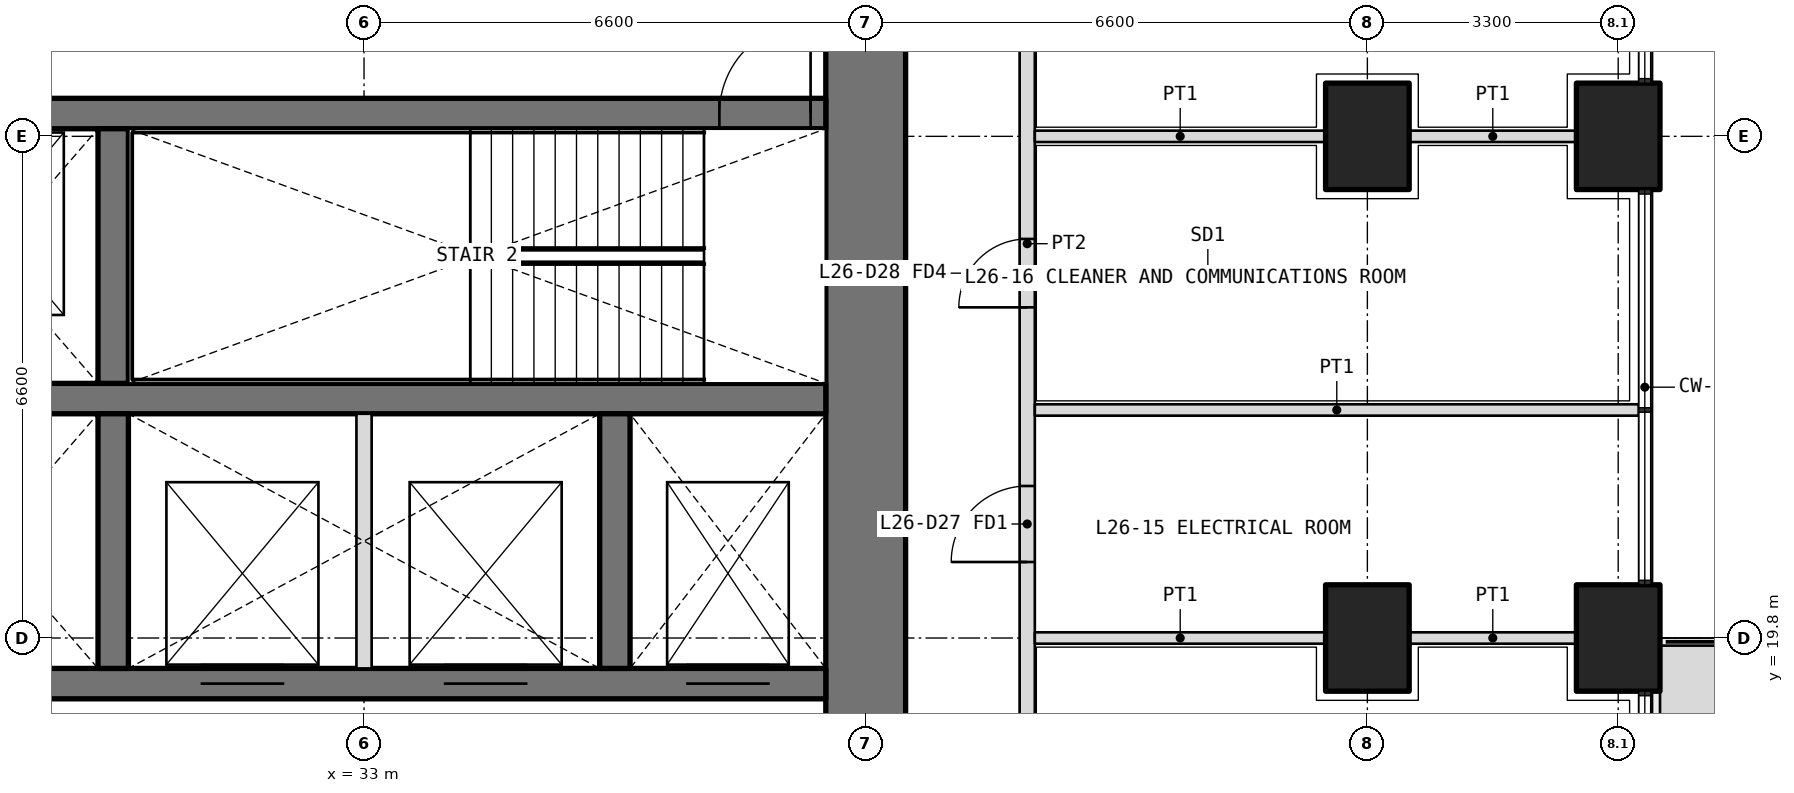
"""IFC4 building model, lengths in metres.
Left out: names, types, materials, properties, quantities, classifications, styles, units other than length and angle.
Written with IfcOpenShell. Run it as: python <this file> out.ifc"""

import sys

from ifc_helpers import new_model, si_unit, direction, frame, frame_2d, origin, origin_2d, place, context, subcontext, project, spatial, polyline, rectangle, outline, extrude, element, fill, save


model = new_model("IFC4")
c1 = context("Model", 3, precision=1e-05, world=origin(), true_north=direction((0.0, 1.0)))
c2 = subcontext(c1, "Body", "Model", "MODEL_VIEW")
j1 = project(units=[si_unit("LENGTHUNIT", "METRE"), si_unit("PLANEANGLEUNIT", "RADIAN")], contexts=[c1])
p1 = place(None, origin())
s1 = spatial("IfcSite", under=j1, at=p1, CompositionType="ELEMENT")
p2 = place(p1, origin())
s2 = spatial("IfcBuilding", under=s1, at=p2, CompositionType="ELEMENT")
p3 = place(p2, frame((0.0, 0.0, 115.8)))
s3 = spatial("IfcBuildingStorey", under=s2, at=p3, CompositionType="ELEMENT", Elevation=115.8)
for number, where, z_axis, x_axis in (
    (1, (49.5, 19.8, 0.0), (0.0, 0.0, 1.0), (0.0, 1.0, 0.0)),
    (2, (49.5, 26.4, 0.0), (0.0, 0.0, 1.0), (0.0, 1.0, 0.0)),
    (3, (46.2, 19.8, 0.0), (0.0, 0.0, 1.0), (0.0, 1.0, 0.0)),
    (4, (46.2, 26.4, 0.0), (0.0, 0.0, 1.0), (0.0, 1.0, 0.0)),
):
    element("IfcColumn", number, at=place(p3, frame(where, z_axis=z_axis, x_axis=x_axis)), inside=s3, PredefinedType="COLUMN", context=c2, shape_type="SweptSolid", body=[
        extrude(rectangle(XDim=1.4, YDim=1.1, at=origin_2d()), origin(), (0.0, 0.0, 1.0), 4.2),
    ])
p4 = place(p3, origin())
e5 = element("IfcWall", 5, at=p4, inside=s3, PredefinedType="USERDEFINED", context=c2, shape_type="SweptSolid", body=[
    extrude(outline(polyline([(50.05, 10.65), (51.05, 10.65), (51.05, 19.7), (50.05, 19.7), (50.05, 10.65)]), holes=[polyline([(50.2, 10.8), (50.9, 10.8), (50.9, 19.55), (50.2, 19.55), (50.2, 10.8)])]), origin(), (0.0, 0.0, 1.0), 1.05),
])
p5 = place(p3, frame((39.6, 13.725, 0.0), z_axis=(0.0, 0.0, 1.0), x_axis=(0.0, 1.0, 0.0)))
e6 = element("IfcWall", 6, at=p5, inside=s3, PredefinedType="SHEAR", context=c2, shape_type="SweptSolid", body=[
    extrude(rectangle(XDim=18.75, YDim=1.05, at=frame_2d((9.375, 0.0))), origin(), (0.0, 0.0, 1.0), 4.2),
])
p6 = place(p5, frame((3.025, 0.0, 0.0)))
e7 = element("IfcOpeningElement", 7, at=p6, cuts=e6, PredefinedType="OPENING", context=c2, shape_type="SweptSolid", body=[
    extrude(rectangle(XDim=1.6, YDim=2.1, at=frame_2d((0.8, 1.05))), frame((0.0, 0.535, 0.0), z_axis=(0.0, -1.0, 0.0), x_axis=(1.0, 0.0, 0.0)), (0.0, 0.0, 1.0), 1.07),
])
p7 = place(p5, frame((13.825, 0.0, 0.0)))
e8 = element("IfcOpeningElement", 8, at=p7, cuts=e6, PredefinedType="OPENING", context=c2, shape_type="SweptSolid", body=[
    extrude(rectangle(XDim=1.6, YDim=2.1, at=frame_2d((0.8, 1.05))), frame((0.0, 0.535, 0.0), z_axis=(0.0, -1.0, 0.0), x_axis=(1.0, 0.0, 0.0)), (0.0, 0.0, 1.0), 1.07),
])
p8 = place(p3, frame((13.725, 19.2, 0.0), z_axis=(0.0, 0.0, 1.0), x_axis=(1.0, 0.0, 0.0)))
e9 = element("IfcWall", 9, at=p8, inside=s3, PredefinedType="SHEAR", context=c2, shape_type="SweptSolid", body=[
    extrude(rectangle(XDim=25.35, YDim=0.4, at=frame_2d((12.675, 0.0))), origin(), (0.0, 0.0, 1.0), 4.2),
])
p9 = place(p8, frame((10.575, 0.0, 0.0)))
e10 = element("IfcOpeningElement", 10, at=p9, cuts=e9, PredefinedType="OPENING", context=c2, shape_type="SweptSolid", body=[
    extrude(rectangle(XDim=0.9, YDim=2.1, at=frame_2d((0.45, 1.05))), frame((0.0, 0.21, 0.0), z_axis=(0.0, -1.0, 0.0), x_axis=(1.0, 0.0, 0.0)), (0.0, 0.0, 1.0), 0.42),
])
p10 = place(p8, frame((13.875, 0.0, 0.0)))
e11 = element("IfcOpeningElement", 11, at=p10, cuts=e9, PredefinedType="OPENING", context=c2, shape_type="SweptSolid", body=[
    extrude(rectangle(XDim=0.9, YDim=2.1, at=frame_2d((0.45, 1.05))), frame((0.0, 0.21, 0.0), z_axis=(0.0, -1.0, 0.0), x_axis=(1.0, 0.0, 0.0)), (0.0, 0.0, 1.0), 0.42),
])
p11 = place(p8, frame((0.2, 0.0, 0.0)))
e12 = element("IfcOpeningElement", 12, at=p11, cuts=e9, PredefinedType="OPENING", context=c2, shape_type="SweptSolid", body=[
    extrude(rectangle(XDim=1.2, YDim=2.1, at=frame_2d((0.6, 1.05))), frame((0.0, 0.21, 0.0), z_axis=(0.0, -1.0, 0.0), x_axis=(1.0, 0.0, 0.0)), (0.0, 0.0, 1.0), 0.42),
])
p12 = place(p8, frame((23.512, 0.0, 0.0)))
e13 = element("IfcOpeningElement", 13, at=p12, cuts=e9, PredefinedType="OPENING", context=c2, shape_type="SweptSolid", body=[
    extrude(rectangle(XDim=1.1, YDim=2.1, at=frame_2d((0.55, 1.05))), frame((0.0, 0.21, 0.0), z_axis=(0.0, -1.0, 0.0), x_axis=(1.0, 0.0, 0.0)), (0.0, 0.0, 1.0), 0.42),
])
p13 = place(p8, frame((17.125, 0.0, 0.0)))
e14 = element("IfcOpeningElement", 14, at=p13, cuts=e9, PredefinedType="OPENING", context=c2, shape_type="SweptSolid", body=[
    extrude(rectangle(XDim=1.1, YDim=2.1, at=frame_2d((0.55, 1.05))), frame((0.0, 0.21, 0.0), z_axis=(0.0, -1.0, 0.0), x_axis=(1.0, 0.0, 0.0)), (0.0, 0.0, 1.0), 0.42),
])
p14 = place(p8, frame((20.325, 0.0, 0.0)))
e15 = element("IfcOpeningElement", 15, at=p14, cuts=e9, PredefinedType="OPENING", context=c2, shape_type="SweptSolid", body=[
    extrude(rectangle(XDim=1.1, YDim=2.1, at=frame_2d((0.55, 1.05))), frame((0.0, 0.21, 0.0), z_axis=(0.0, -1.0, 0.0), x_axis=(1.0, 0.0, 0.0)), (0.0, 0.0, 1.0), 0.42),
])
p15 = place(p3, frame((13.725, 22.95, 0.0), z_axis=(0.0, 0.0, 1.0), x_axis=(1.0, 0.0, 0.0)))
e16 = element("IfcWall", 16, at=p15, inside=s3, PredefinedType="SHEAR", context=c2, shape_type="SweptSolid", body=[
    extrude(rectangle(XDim=25.35, YDim=0.4, at=frame_2d((12.675, 0.0))), origin(), (0.0, 0.0, 1.0), 4.2),
])
p16 = place(p3, frame((13.725, 26.7, 0.0), z_axis=(0.0, 0.0, 1.0), x_axis=(1.0, 0.0, 0.0)))
e17 = element("IfcWall", 17, at=p16, inside=s3, PredefinedType="SHEAR", context=c2, shape_type="SweptSolid", body=[
    extrude(rectangle(XDim=25.35, YDim=0.4, at=frame_2d((12.675, 0.0))), origin(), (0.0, 0.0, 1.0), 4.2),
])
p17 = place(p16, frame((23.95, 0.0, 0.0)))
e18 = element("IfcOpeningElement", 18, at=p17, cuts=e17, PredefinedType="OPENING", context=c2, shape_type="SweptSolid", body=[
    extrude(rectangle(XDim=1.2, YDim=2.1, at=frame_2d((0.6, 1.05))), frame((0.0, 0.21, 0.0), z_axis=(0.0, -1.0, 0.0), x_axis=(1.0, 0.0, 0.0)), (0.0, 0.0, 1.0), 0.42),
])
p18 = place(p16, frame((0.738, 0.0, 0.0)))
e19 = element("IfcOpeningElement", 19, at=p18, cuts=e17, PredefinedType="OPENING", context=c2, shape_type="SweptSolid", body=[
    extrude(rectangle(XDim=1.1, YDim=2.1, at=frame_2d((0.55, 1.05))), frame((0.0, 0.21, 0.0), z_axis=(0.0, -1.0, 0.0), x_axis=(1.0, 0.0, 0.0)), (0.0, 0.0, 1.0), 0.42),
])
p19 = place(p16, frame((3.925, 0.0, 0.0)))
e20 = element("IfcOpeningElement", 20, at=p19, cuts=e17, PredefinedType="OPENING", context=c2, shape_type="SweptSolid", body=[
    extrude(rectangle(XDim=1.1, YDim=2.1, at=frame_2d((0.55, 1.05))), frame((0.0, 0.21, 0.0), z_axis=(0.0, -1.0, 0.0), x_axis=(1.0, 0.0, 0.0)), (0.0, 0.0, 1.0), 0.42),
])
p20 = place(p16, frame((7.175, 0.0, 0.0)))
e21 = element("IfcOpeningElement", 21, at=p20, cuts=e17, PredefinedType="OPENING", context=c2, shape_type="SweptSolid", body=[
    extrude(rectangle(XDim=1.1, YDim=2.1, at=frame_2d((0.55, 1.05))), frame((0.0, 0.21, 0.0), z_axis=(0.0, -1.0, 0.0), x_axis=(1.0, 0.0, 0.0)), (0.0, 0.0, 1.0), 0.42),
])
p21 = place(p16, frame((10.425, 0.0, 0.0)))
e22 = element("IfcOpeningElement", 22, at=p21, cuts=e17, PredefinedType="OPENING", context=c2, shape_type="SweptSolid", body=[
    extrude(rectangle(XDim=1.1, YDim=2.1, at=frame_2d((0.55, 1.05))), frame((0.0, 0.21, 0.0), z_axis=(0.0, -1.0, 0.0), x_axis=(1.0, 0.0, 0.0)), (0.0, 0.0, 1.0), 0.42),
])
p22 = place(p16, frame((13.775, 0.0, 0.0)))
e23 = element("IfcOpeningElement", 23, at=p22, cuts=e17, PredefinedType="OPENING", context=c2, shape_type="SweptSolid", body=[
    extrude(rectangle(XDim=1.1, YDim=2.1, at=frame_2d((0.55, 1.05))), frame((0.0, 0.21, 0.0), z_axis=(0.0, -1.0, 0.0), x_axis=(1.0, 0.0, 0.0)), (0.0, 0.0, 1.0), 0.42),
])
for number, where, z_axis, x_axis in (
    (24, (29.7, 19.4, 0.0), (0.0, 0.0, 1.0), (0.0, 1.0, 0.0)),
    (25, (36.3, 19.4, 0.0), (0.0, 0.0, 1.0), (0.0, 1.0, 0.0)),
    (26, (29.7, 23.15, 0.0), (0.0, 0.0, 1.0), (0.0, 1.0, 0.0)),
):
    element("IfcWall", number, at=place(p3, frame(where, z_axis=z_axis, x_axis=x_axis)), inside=s3, PredefinedType="SHEAR", context=c2, shape_type="SweptSolid", body=[
        extrude(rectangle(XDim=3.35, YDim=0.4, at=frame_2d((1.675, 0.0))), origin(), (0.0, 0.0, 1.0), 4.2),
    ])
p23 = place(p3, frame((33.0, 19.4, 0.0), z_axis=(0.0, 0.0, 1.0), x_axis=(0.0, 1.0, 0.0)))
e27 = element("IfcWall", 27, at=p23, inside=s3, PredefinedType="PARTITIONING", context=c2, shape_type="SweptSolid", body=[
    extrude(rectangle(XDim=3.35, YDim=0.2, at=frame_2d((1.675, 0.0))), origin(), (0.0, 0.0, 1.0), 4.2),
])
p24 = place(p3, frame((41.725, 11.175, 0.0), z_axis=(0.0, 0.0, 1.0), x_axis=(0.0, 1.0, 0.0)))
e28 = element("IfcWall", 28, at=p24, inside=s3, PredefinedType="PARTITIONING", context=c2, shape_type="SweptSolid", body=[
    extrude(rectangle(XDim=27.625, YDim=0.2, at=frame_2d((13.812, 0.0))), origin(), (0.0, 0.0, 1.0), 2.85),
])
p25 = place(p24, frame((3.762, 0.0, 0.0)))
e29 = element("IfcOpeningElement", 29, at=p25, cuts=e28, PredefinedType="OPENING", context=c2, shape_type="SweptSolid", body=[
    extrude(rectangle(XDim=1.0, YDim=2.1, at=frame_2d((0.5, 1.05))), frame((0.0, 0.11, 0.0), z_axis=(0.0, -1.0, 0.0), x_axis=(1.0, 0.0, 0.0)), (0.0, 0.0, 1.0), 0.22),
])
p26 = place(p24, frame((9.625, 0.0, 0.0)))
e30 = element("IfcOpeningElement", 30, at=p26, cuts=e28, PredefinedType="OPENING", context=c2, shape_type="SweptSolid", body=[
    extrude(rectangle(XDim=1.0, YDim=2.1, at=frame_2d((0.5, 1.05))), frame((0.0, 0.11, 0.0), z_axis=(0.0, -1.0, 0.0), x_axis=(1.0, 0.0, 0.0)), (0.0, 0.0, 1.0), 0.22),
])
p27 = place(p24, frame((12.975, 0.0, 0.0)))
e31 = element("IfcOpeningElement", 31, at=p27, cuts=e28, PredefinedType="OPENING", context=c2, shape_type="SweptSolid", body=[
    extrude(rectangle(XDim=0.9, YDim=2.1, at=frame_2d((0.45, 1.05))), frame((0.0, 0.11, 0.0), z_axis=(0.0, -1.0, 0.0), x_axis=(1.0, 0.0, 0.0)), (0.0, 0.0, 1.0), 0.22),
])
p28 = place(p24, frame((19.675, 0.0, 0.0)))
e32 = element("IfcOpeningElement", 32, at=p28, cuts=e28, PredefinedType="OPENING", context=c2, shape_type="SweptSolid", body=[
    extrude(rectangle(XDim=1.0, YDim=2.1, at=frame_2d((0.5, 1.05))), frame((0.0, 0.11, 0.0), z_axis=(0.0, -1.0, 0.0), x_axis=(1.0, 0.0, 0.0)), (0.0, 0.0, 1.0), 0.22),
])
p29 = place(p24, frame((25.925, 0.0, 0.0)))
e33 = element("IfcOpeningElement", 33, at=p29, cuts=e28, PredefinedType="OPENING", context=c2, shape_type="SweptSolid", body=[
    extrude(rectangle(XDim=1.0, YDim=2.1, at=frame_2d((0.5, 1.05))), frame((0.0, 0.11, 0.0), z_axis=(0.0, -1.0, 0.0), x_axis=(1.0, 0.0, 0.0)), (0.0, 0.0, 1.0), 0.22),
])
p30 = place(p3, frame((49.77, 22.8, 0.0), z_axis=(0.0, 0.0, 1.0), x_axis=(-1.0, 0.0, 0.0)))
e34 = element("IfcWall", 34, at=p30, inside=s3, PredefinedType="PARTITIONING", context=c2, shape_type="SweptSolid", body=[
    extrude(rectangle(XDim=7.945, YDim=0.15, at=frame_2d((3.973, 0.0))), origin(), (0.0, 0.0, 1.0), 2.7),
])
p31 = place(p3, frame((48.95, 19.8, 0.0), z_axis=(0.0, 0.0, 1.0), x_axis=(-1.0, 0.0, 0.0)))
e35 = element("IfcWall", 35, at=p31, inside=s3, PredefinedType="PARTITIONING", context=c2, shape_type="SweptSolid", body=[
    extrude(rectangle(XDim=2.2, YDim=0.15, at=frame_2d((1.1, 0.0))), origin(), (0.0, 0.0, 1.0), 2.85),
])
p32 = place(p3, frame((45.65, 19.8, 0.0), z_axis=(0.0, 0.0, 1.0), x_axis=(-1.0, 0.0, 0.0)))
e36 = element("IfcWall", 36, at=p32, inside=s3, PredefinedType="PARTITIONING", context=c2, shape_type="SweptSolid", body=[
    extrude(rectangle(XDim=3.825, YDim=0.15, at=frame_2d((1.913, 0.0))), origin(), (0.0, 0.0, 1.0), 2.85),
])
p33 = place(p3, frame((48.95, 26.4, 0.0), z_axis=(0.0, 0.0, 1.0), x_axis=(-1.0, 0.0, 0.0)))
e37 = element("IfcWall", 37, at=p33, inside=s3, PredefinedType="PARTITIONING", context=c2, shape_type="SweptSolid", body=[
    extrude(rectangle(XDim=2.2, YDim=0.15, at=frame_2d((1.1, 0.0))), origin(), (0.0, 0.0, 1.0), 2.85),
])
p34 = place(p3, frame((45.65, 26.4, 0.0), z_axis=(0.0, 0.0, 1.0), x_axis=(-1.0, 0.0, 0.0)))
e38 = element("IfcWall", 38, at=p34, inside=s3, PredefinedType="PARTITIONING", context=c2, shape_type="SweptSolid", body=[
    extrude(rectangle(XDim=3.825, YDim=0.15, at=frame_2d((1.913, 0.0))), origin(), (0.0, 0.0, 1.0), 2.85),
])
p35 = place(p26, origin())
e39 = element("IfcDoor", 39, at=p35, inside=s3, OperationType="SINGLE_SWING_LEFT", PredefinedType="DOOR", context=c2, shape_type="SweptSolid", body=[
    extrude(rectangle(XDim=1.0, YDim=2.1, at=frame_2d((0.5, 1.05))), frame((0.0, 0.025, 0.0), z_axis=(0.0, -1.0, 0.0), x_axis=(1.0, 0.0, 0.0)), (0.0, 0.0, 1.0), 0.05),
])
fill(e30, e39)
p36 = place(p27, origin())
e40 = element("IfcDoor", 40, at=p36, inside=s3, OperationType="SINGLE_SWING_LEFT", PredefinedType="DOOR", context=c2, shape_type="SweptSolid", body=[
    extrude(rectangle(XDim=0.9, YDim=2.1, at=frame_2d((0.45, 1.05))), frame((0.0, 0.025, 0.0), z_axis=(0.0, -1.0, 0.0), x_axis=(1.0, 0.0, 0.0)), (0.0, 0.0, 1.0), 0.05),
])
fill(e31, e40)
p37 = place(p17, origin())
e41 = element("IfcDoor", 41, at=p37, inside=s3, OperationType="SINGLE_SWING_RIGHT", PredefinedType="DOOR", context=c2, shape_type="SweptSolid", body=[
    extrude(rectangle(XDim=1.2, YDim=2.1, at=frame_2d((0.6, 1.05))), frame((0.0, 0.025, 0.0), z_axis=(0.0, -1.0, 0.0), x_axis=(1.0, 0.0, 0.0)), (0.0, 0.0, 1.0), 0.05),
])
fill(e18, e41)
p38 = place(p12, origin())
e42 = element("IfcDoor", 42, at=p38, inside=s3, OperationType="DOUBLE_DOOR_SLIDING", PredefinedType="DOOR", context=c2, shape_type="SweptSolid", body=[
    extrude(rectangle(XDim=1.1, YDim=2.1, at=frame_2d((0.55, 1.05))), frame((0.0, 0.025, 0.0), z_axis=(0.0, -1.0, 0.0), x_axis=(1.0, 0.0, 0.0)), (0.0, 0.0, 1.0), 0.05),
])
fill(e13, e42)
p39 = place(p13, origin())
e43 = element("IfcDoor", 43, at=p39, inside=s3, OperationType="DOUBLE_DOOR_SLIDING", PredefinedType="DOOR", context=c2, shape_type="SweptSolid", body=[
    extrude(rectangle(XDim=1.1, YDim=2.1, at=frame_2d((0.55, 1.05))), frame((0.0, 0.025, 0.0), z_axis=(0.0, -1.0, 0.0), x_axis=(1.0, 0.0, 0.0)), (0.0, 0.0, 1.0), 0.05),
])
fill(e14, e43)
p40 = place(p14, origin())
e44 = element("IfcDoor", 44, at=p40, inside=s3, OperationType="DOUBLE_DOOR_SLIDING", PredefinedType="DOOR", context=c2, shape_type="SweptSolid", body=[
    extrude(rectangle(XDim=1.1, YDim=2.1, at=frame_2d((0.55, 1.05))), frame((0.0, 0.025, 0.0), z_axis=(0.0, -1.0, 0.0), x_axis=(1.0, 0.0, 0.0)), (0.0, 0.0, 1.0), 0.05),
])
fill(e15, e44)
save(model, sys.argv[1])
